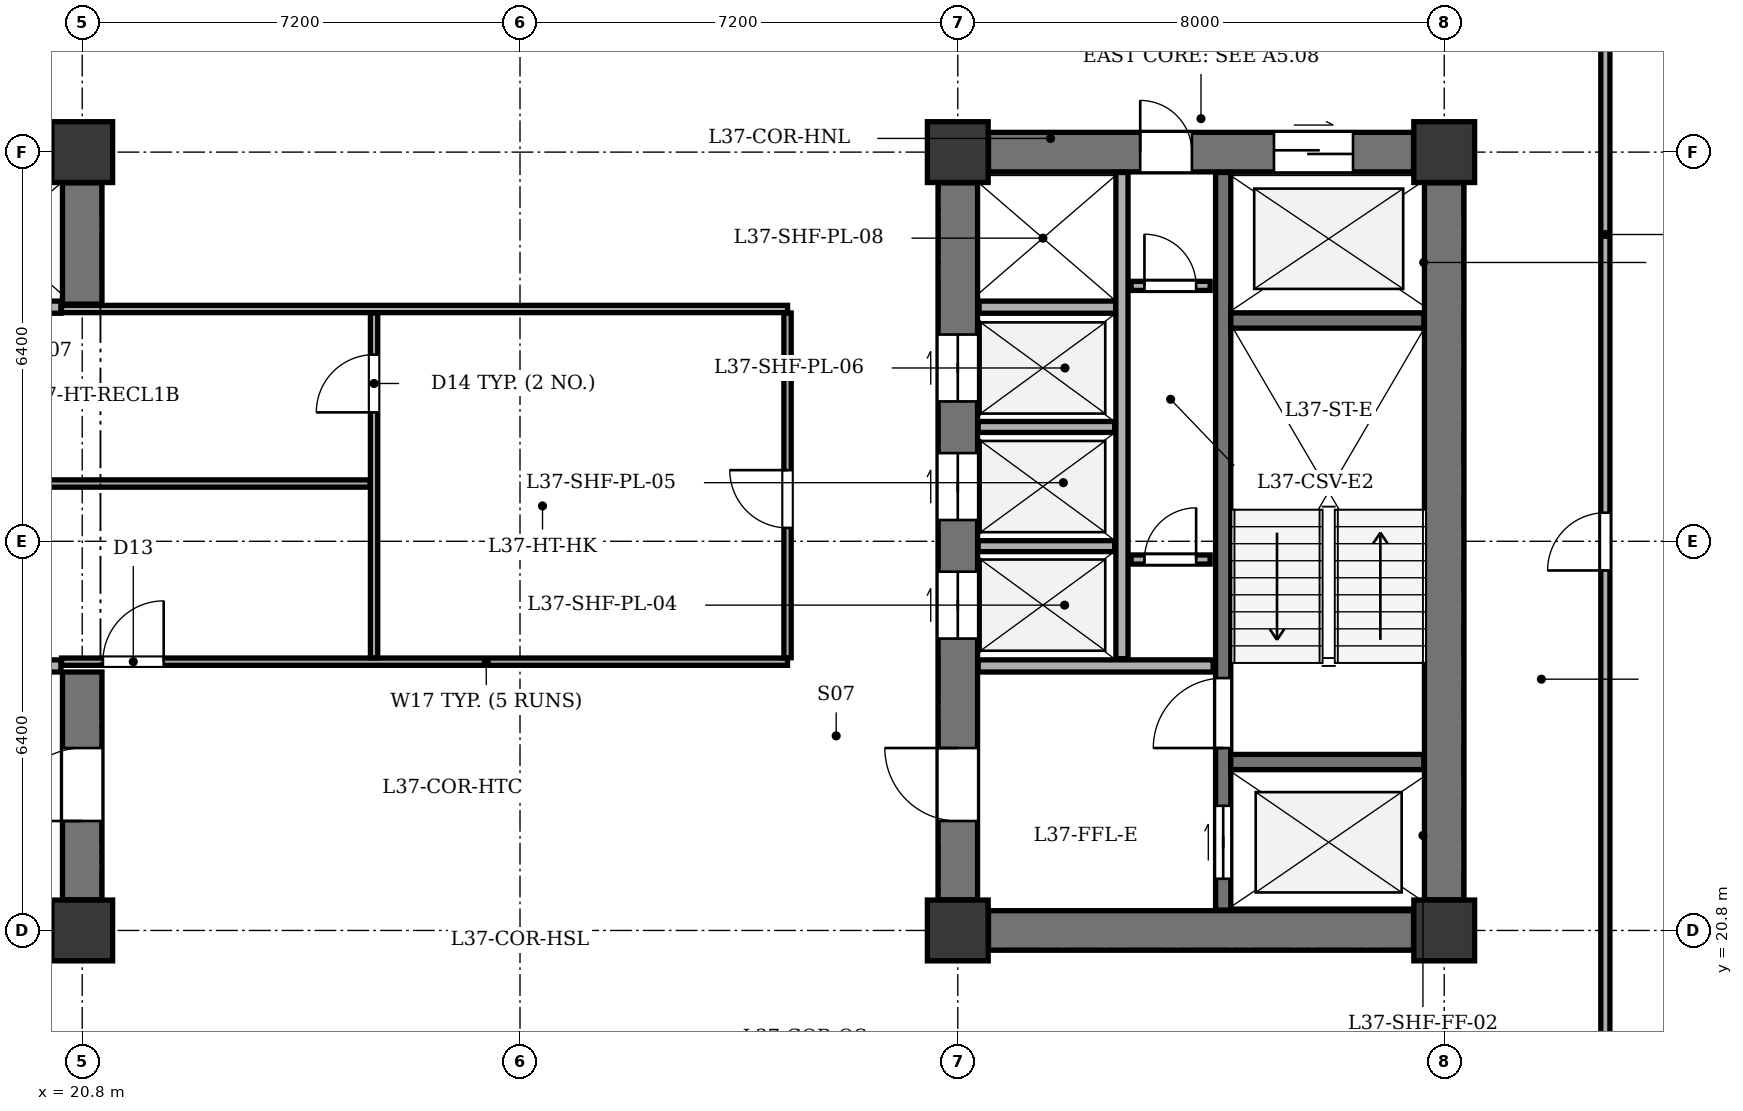
"""IFC4 building model, lengths in metres.
Left out: names, types, materials, properties, quantities, classifications, styles, units other than length and angle.
Written with IfcOpenShell. Run it as: python <this file> out.ifc"""

import sys

from ifc_helpers import new_model, si_unit, direction, frame, frame_2d, origin, origin_2d, place, context, subcontext, project, spatial, rectangle, extrude, element, fill, save


model = new_model("IFC4")
c1 = context("Model", 3, precision=1e-05, world=origin(), true_north=direction((0.0, 1.0)))
c2 = subcontext(c1, "Body", "Model", "MODEL_VIEW")
j1 = project(units=[si_unit("LENGTHUNIT", "METRE"), si_unit("PLANEANGLEUNIT", "RADIAN")], contexts=[c1])
p1 = place(None, origin())
s1 = spatial("IfcSite", under=j1, at=p1, CompositionType="ELEMENT")
p2 = place(p1, origin())
s2 = spatial("IfcBuilding", under=s1, at=p2, CompositionType="ELEMENT")
p3 = place(p2, frame((0.0, 0.0, 148.3)))
s3 = spatial("IfcBuildingStorey", under=s2, at=p3, CompositionType="ELEMENT", Elevation=148.3)
for number, where, z_axis, x_axis in (
    (1, (20.8, 20.8, 0.0), (0.0, 0.0, 1.0), (1.0, 0.0, 0.0)),
    (2, (20.8, 33.6, 0.0), (0.0, 0.0, 1.0), (1.0, 0.0, 0.0)),
    (3, (35.2, 20.8, 0.0), (0.0, 0.0, 1.0), (1.0, 0.0, 0.0)),
    (4, (43.2, 20.8, 0.0), (0.0, 0.0, 1.0), (1.0, 0.0, 0.0)),
    (5, (35.2, 33.6, 0.0), (0.0, 0.0, 1.0), (1.0, 0.0, 0.0)),
    (6, (43.2, 33.6, 0.0), (0.0, 0.0, 1.0), (1.0, 0.0, 0.0)),
):
    element("IfcColumn", number, at=place(p3, frame(where, z_axis=z_axis, x_axis=x_axis)), inside=s3, PredefinedType="COLUMN", context=c2, shape_type="SweptSolid", body=[
        extrude(rectangle(XDim=1.0, YDim=1.0, at=origin_2d()), origin(), (0.0, 0.0, 1.0), 3.5),
    ])
p4 = place(p3, frame((20.8, 21.305, 0.0), z_axis=(0.0, 0.0, 1.0), x_axis=(0.0, 1.0, 0.0)))
e7 = element("IfcWall", 7, at=p4, inside=s3, PredefinedType="SHEAR", context=c2, shape_type="SweptSolid", body=[
    extrude(rectangle(XDim=3.745, YDim=0.65, at=frame_2d((1.873, 0.0))), origin(), (0.0, 0.0, 1.0), 3.2),
])
p5 = place(p4, frame((1.295, 0.0, 0.0)))
e8 = element("IfcOpeningElement", 8, at=p5, cuts=e7, PredefinedType="OPENING", context=c2, shape_type="SweptSolid", body=[
    extrude(rectangle(XDim=1.2, YDim=2.15, at=frame_2d((0.6, 1.075))), frame((0.0, 0.335, 0.0), z_axis=(0.0, -1.0, 0.0), x_axis=(1.0, 0.0, 0.0)), (0.0, 0.0, 1.0), 0.67),
])
p6 = place(p3, frame((20.8, 31.1, 0.0), z_axis=(0.0, 0.0, 1.0), x_axis=(0.0, 1.0, 0.0)))
e9 = element("IfcWall", 9, at=p6, inside=s3, PredefinedType="SHEAR", context=c2, shape_type="SweptSolid", body=[
    extrude(rectangle(XDim=1.995, YDim=0.65, at=frame_2d((0.998, 0.0))), origin(), (0.0, 0.0, 1.0), 3.2),
])
for number, where, z_axis, x_axis in (
    (10, (16.6, 25.15, 0.0), (0.0, 0.0, 1.0), (1.0, 0.0, 0.0)),
    (11, (16.6, 31.05, 0.0), (0.0, 0.0, 1.0), (1.0, 0.0, 0.0)),
):
    element("IfcWall", number, at=place(p3, frame(where, z_axis=z_axis, x_axis=x_axis)), inside=s3, PredefinedType="SOLIDWALL", context=c2, shape_type="SweptSolid", body=[
        extrude(rectangle(XDim=3.85, YDim=0.2, at=frame_2d((1.925, 0.0))), origin(), (0.0, 0.0, 1.0), 3.2),
    ])
p7 = place(p3, frame((43.2, 21.305, 0.0), z_axis=(0.0, 0.0, 1.0), x_axis=(0.0, 1.0, 0.0)))
e12 = element("IfcWall", 12, at=p7, inside=s3, PredefinedType="SHEAR", context=c2, shape_type="SweptSolid", body=[
    extrude(rectangle(XDim=11.79, YDim=0.65, at=frame_2d((5.895, 0.0))), origin(), (0.0, 0.0, 1.0), 3.2),
])
p8 = place(p3, frame((35.705, 20.8, 0.0), z_axis=(0.0, 0.0, 1.0), x_axis=(1.0, 0.0, 0.0)))
e13 = element("IfcWall", 13, at=p8, inside=s3, PredefinedType="SHEAR", context=c2, shape_type="SweptSolid", body=[
    extrude(rectangle(XDim=6.99, YDim=0.65, at=frame_2d((3.495, 0.0))), origin(), (0.0, 0.0, 1.0), 3.2),
])
p9 = place(p3, frame((35.705, 33.6, 0.0), z_axis=(0.0, 0.0, 1.0), x_axis=(1.0, 0.0, 0.0)))
e14 = element("IfcWall", 14, at=p9, inside=s3, PredefinedType="SHEAR", context=c2, shape_type="SweptSolid", body=[
    extrude(rectangle(XDim=6.99, YDim=0.65, at=frame_2d((3.495, 0.0))), origin(), (0.0, 0.0, 1.0), 3.2),
])
p10 = place(p9, frame((4.695, 0.0, 0.0)))
e15 = element("IfcOpeningElement", 15, at=p10, cuts=e14, PredefinedType="OPENING", context=c2, shape_type="SweptSolid", body=[
    extrude(rectangle(XDim=1.3, YDim=2.15, at=frame_2d((0.65, 1.075))), frame((0.0, 0.335, 0.0), z_axis=(0.0, -1.0, 0.0), x_axis=(1.0, 0.0, 0.0)), (0.0, 0.0, 1.0), 0.67),
])
p11 = place(p9, frame((2.495, 0.0, 0.0)))
e16 = element("IfcOpeningElement", 16, at=p11, cuts=e14, PredefinedType="OPENING", context=c2, shape_type="SweptSolid", body=[
    extrude(rectangle(XDim=0.85, YDim=2.02, at=frame_2d((0.425, 1.01))), frame((0.0, 0.335, 0.0), z_axis=(0.0, -1.0, 0.0), x_axis=(1.0, 0.0, 0.0)), (0.0, 0.0, 1.0), 0.67),
])
p12 = place(p3, frame((35.2, 21.305, 0.0), z_axis=(0.0, 0.0, 1.0), x_axis=(0.0, 1.0, 0.0)))
e17 = element("IfcWall", 17, at=p12, inside=s3, PredefinedType="SHEAR", context=c2, shape_type="SweptSolid", body=[
    extrude(rectangle(XDim=11.79, YDim=0.65, at=frame_2d((5.895, 0.0))), origin(), (0.0, 0.0, 1.0), 3.2),
])
p13 = place(p12, frame((1.295, 0.0, 0.0)))
e18 = element("IfcOpeningElement", 18, at=p13, cuts=e17, PredefinedType="OPENING", context=c2, shape_type="SweptSolid", body=[
    extrude(rectangle(XDim=1.2, YDim=2.15, at=frame_2d((0.6, 1.075))), frame((0.0, 0.335, 0.0), z_axis=(0.0, -1.0, 0.0), x_axis=(1.0, 0.0, 0.0)), (0.0, 0.0, 1.0), 0.67),
])
p14 = place(p12, frame((4.295, 0.0, 0.0)))
e19 = element("IfcOpeningElement", 19, at=p14, cuts=e17, PredefinedType="OPENING", context=c2, shape_type="SweptSolid", body=[
    extrude(rectangle(XDim=1.1, YDim=2.1, at=frame_2d((0.55, 1.05))), frame((0.0, 0.335, 0.0), z_axis=(0.0, -1.0, 0.0), x_axis=(1.0, 0.0, 0.0)), (0.0, 0.0, 1.0), 0.67),
])
p15 = place(p12, frame((6.245, 0.0, 0.0)))
e20 = element("IfcOpeningElement", 20, at=p15, cuts=e17, PredefinedType="OPENING", context=c2, shape_type="SweptSolid", body=[
    extrude(rectangle(XDim=1.1, YDim=2.1, at=frame_2d((0.55, 1.05))), frame((0.0, 0.335, 0.0), z_axis=(0.0, -1.0, 0.0), x_axis=(1.0, 0.0, 0.0)), (0.0, 0.0, 1.0), 0.67),
])
p16 = place(p12, frame((8.195, 0.0, 0.0)))
e21 = element("IfcOpeningElement", 21, at=p16, cuts=e17, PredefinedType="OPENING", context=c2, shape_type="SweptSolid", body=[
    extrude(rectangle(XDim=1.1, YDim=2.1, at=frame_2d((0.55, 1.05))), frame((0.0, 0.335, 0.0), z_axis=(0.0, -1.0, 0.0), x_axis=(1.0, 0.0, 0.0)), (0.0, 0.0, 1.0), 0.67),
])
p17 = place(p3, frame((39.565, 21.135, 0.0), z_axis=(0.0, 0.0, 1.0), x_axis=(0.0, 1.0, 0.0)))
e22 = element("IfcWall", 22, at=p17, inside=s3, PredefinedType="SHEAR", context=c2, shape_type="SweptSolid", body=[
    extrude(rectangle(XDim=12.13, YDim=0.25, at=frame_2d((6.065, 0.0))), origin(), (0.0, 0.0, 1.0), 3.2),
])
p18 = place(p17, frame((0.515, 0.0, 0.0)))
e23 = element("IfcOpeningElement", 23, at=p18, cuts=e22, PredefinedType="OPENING", context=c2, shape_type="SweptSolid", body=[
    extrude(rectangle(XDim=1.2, YDim=2.15, at=frame_2d((0.6, 1.075))), frame((0.0, 0.135, 0.0), z_axis=(0.0, -1.0, 0.0), x_axis=(1.0, 0.0, 0.0)), (0.0, 0.0, 1.0), 0.27),
])
p19 = place(p17, frame((2.665, 0.0, 0.0)))
e24 = element("IfcOpeningElement", 24, at=p19, cuts=e22, PredefinedType="OPENING", context=c2, shape_type="SweptSolid", body=[
    extrude(rectangle(XDim=1.15, YDim=2.15, at=frame_2d((0.575, 1.075))), frame((0.0, 0.135, 0.0), z_axis=(0.0, -1.0, 0.0), x_axis=(1.0, 0.0, 0.0)), (0.0, 0.0, 1.0), 0.27),
])
for number, where, z_axis, x_axis in (
    (25, (39.69, 23.57, 0.0), (0.0, 0.0, 1.0), (1.0, 0.0, 0.0)),
    (26, (39.69, 30.83, 0.0), (0.0, 0.0, 1.0), (1.0, 0.0, 0.0)),
):
    element("IfcWall", number, at=place(p3, frame(where, z_axis=z_axis, x_axis=x_axis)), inside=s3, PredefinedType="SHEAR", context=c2, shape_type="SweptSolid", body=[
        extrude(rectangle(XDim=3.175, YDim=0.25, at=frame_2d((1.587, 0.0))), origin(), (0.0, 0.0, 1.0), 3.2),
    ])
p20 = place(p3, frame((35.535, 25.15, 0.0), z_axis=(0.0, 0.0, 1.0), x_axis=(1.0, 0.0, 0.0)))
e27 = element("IfcWall", 27, at=p20, inside=s3, PredefinedType="SOLIDWALL", context=c2, shape_type="SweptSolid", body=[
    extrude(rectangle(XDim=3.865, YDim=0.2, at=frame_2d((1.933, 0.0))), origin(), (0.0, 0.0, 1.0), 3.2),
])
p21 = place(p3, frame((35.55, 31.05, 0.0), z_axis=(0.0, 0.0, 1.0), x_axis=(1.0, 0.0, 0.0)))
e28 = element("IfcWall", 28, at=p21, inside=s3, PredefinedType="SOLIDWALL", context=c2, shape_type="SweptSolid", body=[
    extrude(rectangle(XDim=2.25, YDim=0.2, at=frame_2d((1.125, 0.0))), origin(), (0.0, 0.0, 1.0), 3.2),
])
p22 = place(p3, frame((37.9, 25.27, 0.0), z_axis=(0.0, 0.0, 1.0), x_axis=(0.0, 1.0, 0.0)))
e29 = element("IfcWall", 29, at=p22, inside=s3, PredefinedType="SOLIDWALL", context=c2, shape_type="SweptSolid", body=[
    extrude(rectangle(XDim=7.995, YDim=0.2, at=frame_2d((3.998, 0.0))), origin(), (0.0, 0.0, 1.0), 3.2),
])
for number, where, z_axis, x_axis in (
    (30, (35.535, 27.12, 0.0), (0.0, 0.0, 1.0), (1.0, 0.0, 0.0)),
    (31, (35.535, 29.08, 0.0), (0.0, 0.0, 1.0), (1.0, 0.0, 0.0)),
):
    element("IfcWall", number, at=place(p3, frame(where, z_axis=z_axis, x_axis=x_axis)), inside=s3, PredefinedType="PARTITIONING", context=c2, shape_type="SweptSolid", body=[
        extrude(rectangle(XDim=2.245, YDim=0.18, at=frame_2d((1.123, 0.0))), origin(), (0.0, 0.0, 1.0), 3.2),
    ])
p23 = place(p3, frame((38.05, 26.9, 0.0), z_axis=(0.0, 0.0, 1.0), x_axis=(1.0, 0.0, 0.0)))
e32 = element("IfcWall", 32, at=p23, inside=s3, PredefinedType="PARTITIONING", context=c2, shape_type="SweptSolid", body=[
    extrude(rectangle(XDim=1.3, YDim=0.15, at=frame_2d((0.65, 0.0))), origin(), (0.0, 0.0, 1.0), 3.2),
])
p24 = place(p23, frame((0.22, 0.0, 0.0)))
e33 = element("IfcOpeningElement", 33, at=p24, cuts=e32, PredefinedType="OPENING", context=c2, shape_type="SweptSolid", body=[
    extrude(rectangle(XDim=0.85, YDim=2.02, at=frame_2d((0.425, 1.01))), frame((0.0, 0.085, 0.0), z_axis=(0.0, -1.0, 0.0), x_axis=(1.0, 0.0, 0.0)), (0.0, 0.0, 1.0), 0.17),
])
p25 = place(p3, frame((38.05, 31.4, 0.0), z_axis=(0.0, 0.0, 1.0), x_axis=(1.0, 0.0, 0.0)))
e34 = element("IfcWall", 34, at=p25, inside=s3, PredefinedType="PARTITIONING", context=c2, shape_type="SweptSolid", body=[
    extrude(rectangle(XDim=1.3, YDim=0.15, at=frame_2d((0.65, 0.0))), origin(), (0.0, 0.0, 1.0), 3.2),
])
p26 = place(p25, frame((0.22, 0.0, 0.0)))
e35 = element("IfcOpeningElement", 35, at=p26, cuts=e34, PredefinedType="OPENING", context=c2, shape_type="SweptSolid", body=[
    extrude(rectangle(XDim=0.85, YDim=2.02, at=frame_2d((0.425, 1.01))), frame((0.0, 0.085, 0.0), z_axis=(0.0, -1.0, 0.0), x_axis=(1.0, 0.0, 0.0)), (0.0, 0.0, 1.0), 0.17),
])
p27 = place(p3, frame((20.46, 25.22, 0.0), z_axis=(0.0, 0.0, 1.0), x_axis=(1.0, 0.0, 0.0)))
e36 = element("IfcWall", 36, at=p27, inside=s3, PredefinedType="PARTITIONING", context=c2, shape_type="SweptSolid", body=[
    extrude(rectangle(XDim=11.94, YDim=0.12, at=frame_2d((5.97, 0.0))), origin(), (0.0, 0.0, 1.0), 3.2),
])
p28 = place(p27, frame((0.68, 0.0, 0.0)))
e37 = element("IfcOpeningElement", 37, at=p28, cuts=e36, PredefinedType="OPENING", context=c2, shape_type="SweptSolid", body=[
    extrude(rectangle(XDim=1.0, YDim=2.1, at=frame_2d((0.5, 1.05))), frame((0.0, 0.07, 0.0), z_axis=(0.0, -1.0, 0.0), x_axis=(1.0, 0.0, 0.0)), (0.0, 0.0, 1.0), 0.14),
])
p29 = place(p3, frame((20.46, 31.02, 0.0), z_axis=(0.0, 0.0, 1.0), x_axis=(1.0, 0.0, 0.0)))
e38 = element("IfcWall", 38, at=p29, inside=s3, PredefinedType="PARTITIONING", context=c2, shape_type="SweptSolid", body=[
    extrude(rectangle(XDim=11.94, YDim=0.12, at=frame_2d((5.97, 0.0))), origin(), (0.0, 0.0, 1.0), 3.2),
])
p30 = place(p3, frame((32.4, 25.285, 0.0), z_axis=(0.0, 0.0, 1.0), x_axis=(0.0, 1.0, 0.0)))
e39 = element("IfcWall", 39, at=p30, inside=s3, PredefinedType="PARTITIONING", context=c2, shape_type="SweptSolid", body=[
    extrude(rectangle(XDim=5.67, YDim=0.12, at=frame_2d((2.835, 0.0))), origin(), (0.0, 0.0, 1.0), 3.2),
])
p31 = place(p30, frame((2.135, 0.0, 0.0)))
e40 = element("IfcOpeningElement", 40, at=p31, cuts=e39, PredefinedType="OPENING", context=c2, shape_type="SweptSolid", body=[
    extrude(rectangle(XDim=0.95, YDim=2.1, at=frame_2d((0.475, 1.05))), frame((0.0, 0.07, 0.0), z_axis=(0.0, -1.0, 0.0), x_axis=(1.0, 0.0, 0.0)), (0.0, 0.0, 1.0), 0.14),
])
p32 = place(p3, frame((25.6, 25.285, 0.0), z_axis=(0.0, 0.0, 1.0), x_axis=(0.0, 1.0, 0.0)))
e41 = element("IfcWall", 41, at=p32, inside=s3, PredefinedType="PARTITIONING", context=c2, shape_type="SweptSolid", body=[
    extrude(rectangle(XDim=5.67, YDim=0.12, at=frame_2d((2.835, 0.0))), origin(), (0.0, 0.0, 1.0), 3.2),
])
p33 = place(p32, frame((4.035, 0.0, 0.0)))
e42 = element("IfcOpeningElement", 42, at=p33, cuts=e41, PredefinedType="OPENING", context=c2, shape_type="SweptSolid", body=[
    extrude(rectangle(XDim=0.95, YDim=2.1, at=frame_2d((0.475, 1.05))), frame((0.0, 0.07, 0.0), z_axis=(0.0, -1.0, 0.0), x_axis=(1.0, 0.0, 0.0)), (0.0, 0.0, 1.0), 0.14),
])
p34 = place(p3, frame((16.65, 28.15, 0.0), z_axis=(0.0, 0.0, 1.0), x_axis=(1.0, 0.0, 0.0)))
e43 = element("IfcWall", 43, at=p34, inside=s3, PredefinedType="PARTITIONING", context=c2, shape_type="SweptSolid", body=[
    extrude(rectangle(XDim=8.885, YDim=0.12, at=frame_2d((4.442, 0.0))), origin(), (0.0, 0.0, 1.0), 3.2),
])
p35 = place(p3, frame((45.85, 17.93, 0.0), z_axis=(0.0, 0.0, 1.0), x_axis=(0.0, 1.0, 0.0)))
e44 = element("IfcWall", 44, at=p35, inside=s3, PredefinedType="PARTITIONING", context=c2, shape_type="SweptSolid", body=[
    extrude(rectangle(XDim=18.54, YDim=0.15, at=frame_2d((9.27, 0.0))), origin(), (0.0, 0.0, 1.0), 3.2),
])
p36 = place(p35, frame((8.79, 0.0, 0.0)))
e45 = element("IfcOpeningElement", 45, at=p36, cuts=e44, PredefinedType="OPENING", context=c2, shape_type="SweptSolid", body=[
    extrude(rectangle(XDim=0.95, YDim=2.1, at=frame_2d((0.475, 1.05))), frame((0.0, 0.085, 0.0), z_axis=(0.0, -1.0, 0.0), x_axis=(1.0, 0.0, 0.0)), (0.0, 0.0, 1.0), 0.17),
])
p37 = place(p5, origin())
e46 = element("IfcDoor", 46, at=p37, inside=s3, OperationType="SINGLE_SWING_LEFT", PredefinedType="DOOR", context=c2, shape_type="SweptSolid", body=[
    extrude(rectangle(XDim=1.2, YDim=2.15, at=frame_2d((0.6, 1.075))), frame((0.0, 0.025, 0.0), z_axis=(0.0, -1.0, 0.0), x_axis=(1.0, 0.0, 0.0)), (0.0, 0.0, 1.0), 0.05),
])
fill(e8, e46)
p38 = place(p10, origin())
e47 = element("IfcDoor", 47, at=p38, inside=s3, OperationType="DOUBLE_DOOR_SLIDING", PredefinedType="DOOR", context=c2, shape_type="SweptSolid", body=[
    extrude(rectangle(XDim=1.3, YDim=2.15, at=frame_2d((0.65, 1.075))), frame((0.0, 0.025, 0.0), z_axis=(0.0, -1.0, 0.0), x_axis=(1.0, 0.0, 0.0)), (0.0, 0.0, 1.0), 0.05),
])
fill(e15, e47)
p39 = place(p11, origin())
e48 = element("IfcDoor", 48, at=p39, inside=s3, OperationType="SINGLE_SWING_LEFT", PredefinedType="DOOR", context=c2, shape_type="SweptSolid", body=[
    extrude(rectangle(XDim=0.85, YDim=2.02, at=frame_2d((0.425, 1.01))), frame((0.0, 0.025, 0.0), z_axis=(0.0, -1.0, 0.0), x_axis=(1.0, 0.0, 0.0)), (0.0, 0.0, 1.0), 0.05),
])
fill(e16, e48)
p40 = place(p13, origin())
e49 = element("IfcDoor", 49, at=p40, inside=s3, OperationType="SINGLE_SWING_RIGHT", PredefinedType="DOOR", context=c2, shape_type="SweptSolid", body=[
    extrude(rectangle(XDim=1.2, YDim=2.15, at=frame_2d((0.6, 1.075))), frame((0.0, 0.025, 0.0), z_axis=(0.0, -1.0, 0.0), x_axis=(1.0, 0.0, 0.0)), (0.0, 0.0, 1.0), 0.05),
])
fill(e18, e49)
p41 = place(p14, origin())
e50 = element("IfcDoor", 50, at=p41, inside=s3, OperationType="DOUBLE_DOOR_SLIDING", PredefinedType="DOOR", context=c2, shape_type="SweptSolid", body=[
    extrude(rectangle(XDim=1.1, YDim=2.1, at=frame_2d((0.55, 1.05))), frame((0.0, 0.025, 0.0), z_axis=(0.0, -1.0, 0.0), x_axis=(1.0, 0.0, 0.0)), (0.0, 0.0, 1.0), 0.05),
])
fill(e19, e50)
p42 = place(p15, origin())
e51 = element("IfcDoor", 51, at=p42, inside=s3, OperationType="DOUBLE_DOOR_SLIDING", PredefinedType="DOOR", context=c2, shape_type="SweptSolid", body=[
    extrude(rectangle(XDim=1.1, YDim=2.1, at=frame_2d((0.55, 1.05))), frame((0.0, 0.025, 0.0), z_axis=(0.0, -1.0, 0.0), x_axis=(1.0, 0.0, 0.0)), (0.0, 0.0, 1.0), 0.05),
])
fill(e20, e51)
p43 = place(p16, origin())
e52 = element("IfcDoor", 52, at=p43, inside=s3, OperationType="DOUBLE_DOOR_SLIDING", PredefinedType="DOOR", context=c2, shape_type="SweptSolid", body=[
    extrude(rectangle(XDim=1.1, YDim=2.1, at=frame_2d((0.55, 1.05))), frame((0.0, 0.025, 0.0), z_axis=(0.0, -1.0, 0.0), x_axis=(1.0, 0.0, 0.0)), (0.0, 0.0, 1.0), 0.05),
])
fill(e21, e52)
p44 = place(p18, origin())
e53 = element("IfcDoor", 53, at=p44, inside=s3, OperationType="DOUBLE_DOOR_SLIDING", PredefinedType="DOOR", context=c2, shape_type="SweptSolid", body=[
    extrude(rectangle(XDim=1.2, YDim=2.15, at=frame_2d((0.6, 1.075))), frame((0.0, 0.025, 0.0), z_axis=(0.0, -1.0, 0.0), x_axis=(1.0, 0.0, 0.0)), (0.0, 0.0, 1.0), 0.05),
])
fill(e23, e53)
p45 = place(p19, origin())
e54 = element("IfcDoor", 54, at=p45, inside=s3, OperationType="SINGLE_SWING_LEFT", PredefinedType="DOOR", context=c2, shape_type="SweptSolid", body=[
    extrude(rectangle(XDim=1.15, YDim=2.15, at=frame_2d((0.575, 1.075))), frame((0.0, 0.025, 0.0), z_axis=(0.0, -1.0, 0.0), x_axis=(1.0, 0.0, 0.0)), (0.0, 0.0, 1.0), 0.05),
])
fill(e24, e54)
p46 = place(p24, origin())
e55 = element("IfcDoor", 55, at=p46, inside=s3, OperationType="SINGLE_SWING_RIGHT", PredefinedType="DOOR", context=c2, shape_type="SweptSolid", body=[
    extrude(rectangle(XDim=0.85, YDim=2.02, at=frame_2d((0.425, 1.01))), frame((0.0, 0.025, 0.0), z_axis=(0.0, -1.0, 0.0), x_axis=(1.0, 0.0, 0.0)), (0.0, 0.0, 1.0), 0.05),
])
fill(e33, e55)
p47 = place(p26, origin())
e56 = element("IfcDoor", 56, at=p47, inside=s3, OperationType="SINGLE_SWING_LEFT", PredefinedType="DOOR", context=c2, shape_type="SweptSolid", body=[
    extrude(rectangle(XDim=0.85, YDim=2.02, at=frame_2d((0.425, 1.01))), frame((0.0, 0.025, 0.0), z_axis=(0.0, -1.0, 0.0), x_axis=(1.0, 0.0, 0.0)), (0.0, 0.0, 1.0), 0.05),
])
fill(e35, e56)
p48 = place(p28, origin())
e57 = element("IfcDoor", 57, at=p48, inside=s3, OperationType="SINGLE_SWING_RIGHT", PredefinedType="DOOR", context=c2, shape_type="SweptSolid", body=[
    extrude(rectangle(XDim=1.0, YDim=2.1, at=frame_2d((0.5, 1.05))), frame((0.0, 0.025, 0.0), z_axis=(0.0, -1.0, 0.0), x_axis=(1.0, 0.0, 0.0)), (0.0, 0.0, 1.0), 0.05),
])
fill(e37, e57)
p49 = place(p33, origin())
e58 = element("IfcDoor", 58, at=p49, inside=s3, OperationType="SINGLE_SWING_LEFT", PredefinedType="DOOR", context=c2, shape_type="SweptSolid", body=[
    extrude(rectangle(XDim=0.95, YDim=2.1, at=frame_2d((0.475, 1.05))), frame((0.0, 0.025, 0.0), z_axis=(0.0, -1.0, 0.0), x_axis=(1.0, 0.0, 0.0)), (0.0, 0.0, 1.0), 0.05),
])
fill(e42, e58)
p50 = place(p31, origin())
e59 = element("IfcDoor", 59, at=p50, inside=s3, OperationType="SINGLE_SWING_RIGHT", PredefinedType="DOOR", context=c2, shape_type="SweptSolid", body=[
    extrude(rectangle(XDim=0.95, YDim=2.1, at=frame_2d((0.475, 1.05))), frame((0.0, 0.025, 0.0), z_axis=(0.0, -1.0, 0.0), x_axis=(1.0, 0.0, 0.0)), (0.0, 0.0, 1.0), 0.05),
])
fill(e40, e59)
p51 = place(p36, origin())
e60 = element("IfcDoor", 60, at=p51, inside=s3, OperationType="SINGLE_SWING_LEFT", PredefinedType="DOOR", context=c2, shape_type="SweptSolid", body=[
    extrude(rectangle(XDim=0.95, YDim=2.1, at=frame_2d((0.475, 1.05))), frame((0.0, 0.025, 0.0), z_axis=(0.0, -1.0, 0.0), x_axis=(1.0, 0.0, 0.0)), (0.0, 0.0, 1.0), 0.05),
])
fill(e45, e60)
save(model, sys.argv[1])
